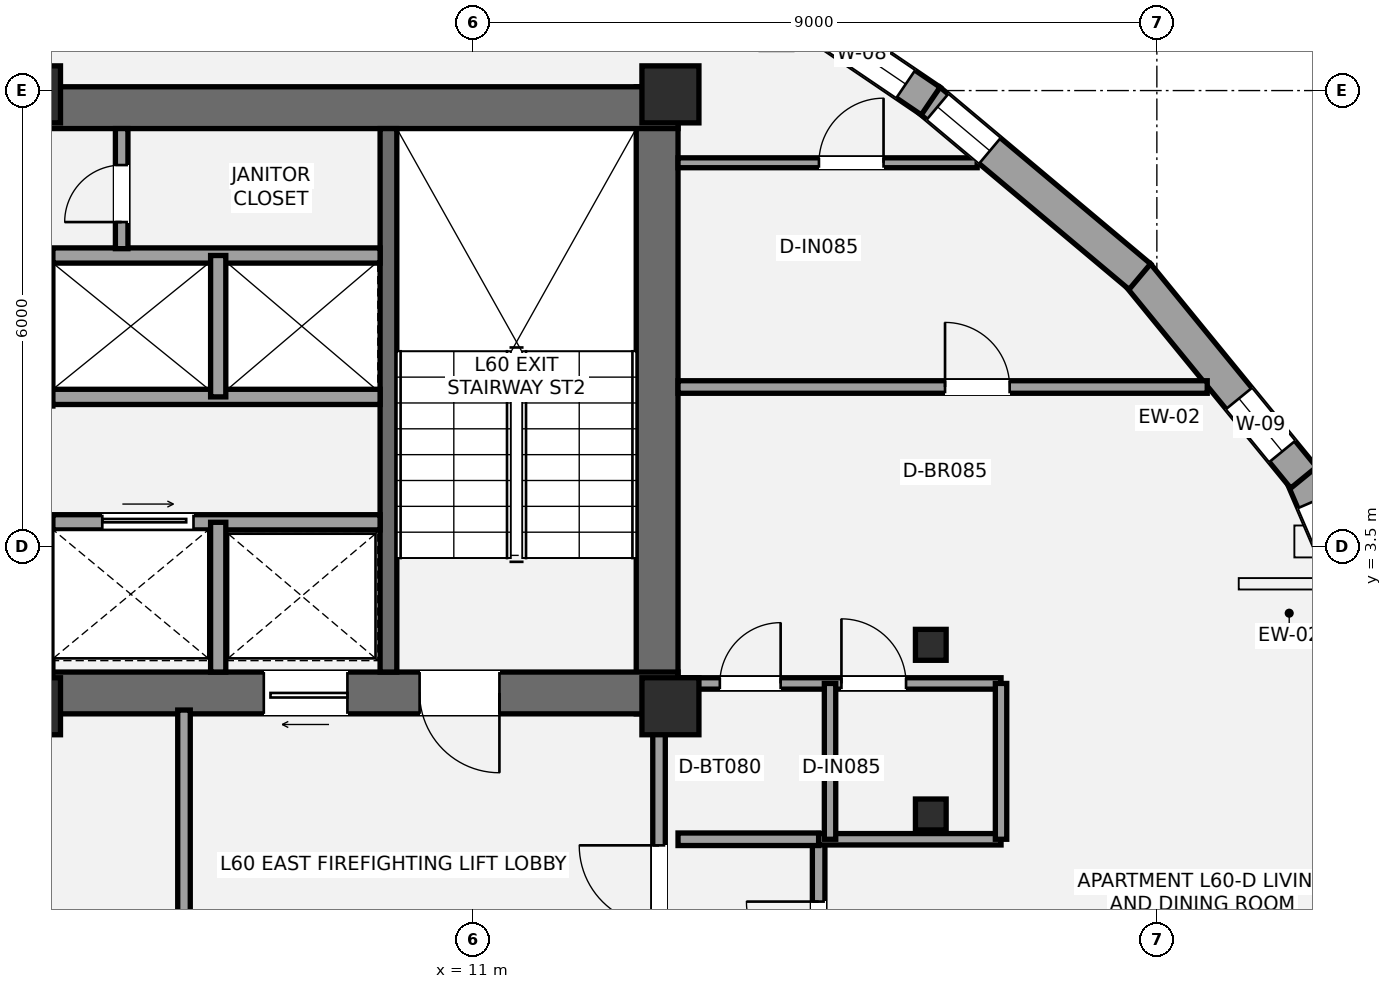
"""IFC4 building model, lengths in metres.
Left out: names, types, materials, properties, quantities, classifications, styles, units other than length and angle.
Written with IfcOpenShell. Run it as: python <this file> out.ifc"""

import sys

from ifc_helpers import new_model, si_unit, direction, frame, frame_2d, origin, origin_2d, place, context, subcontext, project, spatial, rectangle, i_section, extrude, element, fill, save


model = new_model("IFC4")
c1 = context("Model", 3, precision=1e-05, world=origin(), true_north=direction((0.0, 1.0)))
c2 = subcontext(c1, "Body", "Model", "MODEL_VIEW")
j1 = project(units=[si_unit("LENGTHUNIT", "METRE"), si_unit("PLANEANGLEUNIT", "RADIAN")], contexts=[c1])
p1 = place(None, origin())
s1 = spatial("IfcSite", under=j1, at=p1, CompositionType="ELEMENT")
p2 = place(p1, origin())
s2 = spatial("IfcBuilding", under=s1, at=p2, CompositionType="ELEMENT")
p3 = place(p2, frame((0.0, 0.0, 216.3)))
s3 = spatial("IfcBuildingStorey", under=s2, at=p3, CompositionType="ELEMENT", Elevation=216.3)
p4 = place(p3, frame((13.425, 1.3, 0.0), z_axis=(0.0, 0.0, 1.0), x_axis=(0.0, 1.0, 0.0)))
e1 = element("IfcWall", 1, at=p4, inside=s3, PredefinedType="SHEAR", context=c2, shape_type="SweptSolid", body=[
    extrude(rectangle(XDim=8.25, YDim=0.55, at=frame_2d((4.125, 0.0))), origin(), (0.0, 0.0, 1.0), 3.15),
])
p5 = place(p3, frame((4.525, 9.275, 0.0), z_axis=(0.0, 0.0, 1.0), x_axis=(1.0, 0.0, 0.0)))
e2 = element("IfcWall", 2, at=p5, inside=s3, PredefinedType="SHEAR", context=c2, shape_type="SweptSolid", body=[
    extrude(rectangle(XDim=9.175, YDim=0.55, at=frame_2d((4.587, 0.0))), origin(), (0.0, 0.0, 1.0), 3.15),
])
p6 = place(p3, frame((13.7, 1.575, 0.0), z_axis=(0.0, 0.0, 1.0), x_axis=(-1.0, 0.0, 0.0)))
e3 = element("IfcWall", 3, at=p6, inside=s3, PredefinedType="SHEAR", context=c2, shape_type="SweptSolid", body=[
    extrude(rectangle(XDim=8.775, YDim=0.55, at=frame_2d((4.387, 0.0))), origin(), (0.0, 0.0, 1.0), 3.15),
])
p7 = place(p6, frame((2.35, 0.0, 0.0)))
e4 = element("IfcOpeningElement", 4, at=p7, cuts=e3, PredefinedType="OPENING", context=c2, shape_type="SweptSolid", body=[
    extrude(rectangle(XDim=1.05, YDim=2.15, at=frame_2d((0.525, 1.075))), frame((0.0, 0.285, 0.0), z_axis=(0.0, -1.0, 0.0), x_axis=(1.0, 0.0, 0.0)), (0.0, 0.0, 1.0), 0.57),
])
p8 = place(p6, frame((4.35, 0.0, 0.0)))
e5 = element("IfcOpeningElement", 5, at=p8, cuts=e3, PredefinedType="OPENING", context=c2, shape_type="SweptSolid", body=[
    extrude(rectangle(XDim=1.1, YDim=2.2, at=frame_2d((0.55, 1.1))), frame((0.0, 0.285, 0.0), z_axis=(0.0, -1.0, 0.0), x_axis=(1.0, 0.0, 0.0)), (0.0, 0.0, 1.0), 0.57),
])
p9 = place(p3, frame((5.2, 1.3, 0.0), z_axis=(0.0, 0.0, 1.0), x_axis=(0.0, 1.0, 0.0)))
e6 = element("IfcWall", 6, at=p9, inside=s3, PredefinedType="SHEAR", context=c2, shape_type="SweptSolid", body=[
    extrude(rectangle(XDim=2.5, YDim=0.55, at=frame_2d((1.25, 0.0))), origin(), (0.0, 0.0, 1.0), 3.15),
])
p10 = place(p3, frame((5.2, 5.35, 0.0), z_axis=(0.0, 0.0, 1.0), x_axis=(0.0, 1.0, 0.0)))
e7 = element("IfcWall", 7, at=p10, inside=s3, PredefinedType="SHEAR", context=c2, shape_type="SweptSolid", body=[
    extrude(rectangle(XDim=2.0, YDim=0.55, at=frame_2d((1.0, 0.0))), origin(), (0.0, 0.0, 1.0), 3.15),
])
p11 = place(p3, frame((9.89, 1.85, 0.0), z_axis=(0.0, 0.0, 1.0), x_axis=(0.0, 1.0, 0.0)))
e8 = element("IfcWall", 8, at=p11, inside=s3, PredefinedType="SHEAR", context=c2, shape_type="SweptSolid", body=[
    extrude(rectangle(XDim=7.15, YDim=0.22, at=frame_2d((3.575, 0.0))), origin(), (0.0, 0.0, 1.0), 3.15),
])
for number, where, z_axis, x_axis in (
    (9, (5.2, 1.4, 0.0), (0.0, 0.0, 1.0), (1.0, 0.0, 0.0)),
    (10, (5.2, 9.45, 0.0), (0.0, 0.0, 1.0), (1.0, 0.0, 0.0)),
    (11, (13.6, 1.4, 0.0), (0.0, 0.0, 1.0), (1.0, 0.0, 0.0)),
    (12, (13.6, 9.45, 0.0), (0.0, 0.0, 1.0), (1.0, 0.0, 0.0)),
):
    element("IfcColumn", number, at=place(p3, frame(where, z_axis=z_axis, x_axis=x_axis)), inside=s3, PredefinedType="PILASTER", context=c2, shape_type="SweptSolid", body=[
        extrude(rectangle(XDim=0.75, YDim=0.75, at=origin_2d()), origin(), (0.0, 0.0, 1.0), 3.15),
    ])
for number, where, z_axis, x_axis in (
    (13, (17.026, 2.208, 0.0), (0.0, 0.0, 1.0), (1.0, 0.0, 0.0)),
    (14, (17.026, -0.024, 0.0), (0.0, 0.0, 1.0), (1.0, 0.0, 0.0)),
):
    element("IfcColumn", number, at=place(p3, frame(where, z_axis=z_axis, x_axis=x_axis)), inside=s3, PredefinedType="COLUMN", context=c2, shape_type="SweptSolid", body=[
        extrude(i_section(OverallWidth=0.404, OverallDepth=0.407, WebThickness=0.027, FlangeThickness=0.044, at=origin_2d()), origin(), (0.0, 0.0, 1.0), 3.15),
    ])
p12 = place(p3, frame((21.899, 4.46, 0.0), z_axis=(0.0, 0.0, 1.0), x_axis=(0.394735370712, -0.918794855835, 0.0)))
e15 = element("IfcWall", 15, at=p12, inside=s3, PredefinedType="STANDARD", context=c2, shape_type="SweptSolid", body=[
    extrude(rectangle(XDim=3.249, YDim=0.44, at=frame_2d((1.625, 0.0))), origin(), (0.0, 0.0, 1.0), 2.336),
])
p13 = place(p12, frame((0.4, 0.0, 0.55)))
e16 = element("IfcOpeningElement", 16, at=p13, cuts=e15, PredefinedType="OPENING", context=c2, shape_type="SweptSolid", body=[
    extrude(rectangle(XDim=1.4, YDim=1.55, at=frame_2d((0.7, 0.775))), frame((0.0, 0.23, 0.0), z_axis=(0.0, -1.0, 0.0), x_axis=(1.0, 0.0, 0.0)), (0.0, 0.0, 1.0), 0.46),
])
p14 = place(p3, frame((19.747, 7.081, 0.0), z_axis=(0.0, 0.0, 1.0), x_axis=(0.632725461905, -0.774376194015, 0.0)))
e17 = element("IfcWall", 17, at=p14, inside=s3, PredefinedType="STANDARD", context=c2, shape_type="SweptSolid", body=[
    extrude(rectangle(XDim=3.452, YDim=0.44, at=frame_2d((1.726, 0.0))), origin(), (0.0, 0.0, 1.0), 2.336),
])
p15 = place(p14, frame((2.108, 0.0, 0.58)))
e18 = element("IfcOpeningElement", 18, at=p15, cuts=e17, PredefinedType="OPENING", context=c2, shape_type="SweptSolid", body=[
    extrude(rectangle(XDim=0.9, YDim=1.35, at=frame_2d((0.45, 0.675))), frame((0.0, 0.23, 0.0), z_axis=(0.0, -1.0, 0.0), x_axis=(1.0, 0.0, 0.0)), (0.0, 0.0, 1.0), 0.46),
])
p16 = place(p3, frame((17.006, 9.376, 0.0), z_axis=(0.0, 0.0, 1.0), x_axis=(0.766063904081, -0.642764416302, 0.0)))
e19 = element("IfcWall", 19, at=p16, inside=s3, PredefinedType="STANDARD", context=c2, shape_type="SweptSolid", body=[
    extrude(rectangle(XDim=3.615, YDim=0.44, at=frame_2d((1.808, 0.0))), origin(), (0.0, 0.0, 1.0), 2.336),
])
p17 = place(p16, frame((0.14, 0.0, 0.58)))
e20 = element("IfcOpeningElement", 20, at=p17, cuts=e19, PredefinedType="OPENING", context=c2, shape_type="SweptSolid", body=[
    extrude(rectangle(XDim=0.9, YDim=1.35, at=frame_2d((0.45, 0.675))), frame((0.0, 0.23, 0.0), z_axis=(0.0, -1.0, 0.0), x_axis=(1.0, 0.0, 0.0)), (0.0, 0.0, 1.0), 0.46),
])
p18 = place(p3, frame((13.949, 11.448, 0.0), z_axis=(0.0, 0.0, 1.0), x_axis=(0.827595704154, -0.561324639105, 0.0)))
e21 = element("IfcWall", 21, at=p18, inside=s3, PredefinedType="STANDARD", context=c2, shape_type="SweptSolid", body=[
    extrude(rectangle(XDim=3.715, YDim=0.44, at=frame_2d((1.858, 0.0))), origin(), (0.0, 0.0, 1.0), 2.336),
])
p19 = place(p18, frame((1.919, 0.0, 0.58)))
e22 = element("IfcOpeningElement", 22, at=p19, cuts=e21, PredefinedType="OPENING", context=c2, shape_type="SweptSolid", body=[
    extrude(rectangle(XDim=1.4, YDim=1.55, at=frame_2d((0.7, 0.775))), frame((0.0, 0.23, 0.0), z_axis=(0.0, -1.0, 0.0), x_axis=(1.0, 0.0, 0.0)), (0.0, 0.0, 1.0), 0.46),
])
p20 = place(p3, frame((7.2, -2.15, 0.0), z_axis=(0.0, 0.0, 1.0), x_axis=(0.0, 1.0, 0.0)))
e23 = element("IfcWall", 23, at=p20, inside=s3, PredefinedType="PARTITIONING", context=c2, shape_type="SweptSolid", body=[
    extrude(rectangle(XDim=3.5, YDim=0.165, at=frame_2d((1.75, 0.0))), origin(), (0.0, 0.0, 1.0), 2.423),
])
p21 = place(p3, frame((13.45, -2.15, 0.0), z_axis=(0.0, 0.0, 1.0), x_axis=(0.0, 1.0, 0.0)))
e24 = element("IfcWall", 24, at=p21, inside=s3, PredefinedType="PARTITIONING", context=c2, shape_type="SweptSolid", body=[
    extrude(rectangle(XDim=3.5, YDim=0.165, at=frame_2d((1.75, 0.0))), origin(), (0.0, 0.0, 1.0), 2.423),
])
p22 = place(p21, frame((0.67, 0.0, 0.0)))
e25 = element("IfcOpeningElement", 25, at=p22, cuts=e24, PredefinedType="OPENING", context=c2, shape_type="SweptSolid", body=[
    extrude(rectangle(XDim=1.05, YDim=2.15, at=frame_2d((0.525, 1.075))), frame((0.0, 0.093, 0.0), z_axis=(0.0, -1.0, 0.0), x_axis=(1.0, 0.0, 0.0)), (0.0, 0.0, 1.0), 0.185),
])
p23 = place(p3, frame((5.475, 3.82, 0.0), z_axis=(0.0, 0.0, 1.0), x_axis=(1.0, 0.0, 0.0)))
e26 = element("IfcWall", 26, at=p23, inside=s3, PredefinedType="SOLIDWALL", context=c2, shape_type="SweptSolid", body=[
    extrude(rectangle(XDim=4.305, YDim=0.2, at=frame_2d((2.152, 0.0))), origin(), (0.0, 0.0, 1.0), 2.97),
])
p24 = place(p23, frame((0.65, 0.0, 0.0)))
e27 = element("IfcOpeningElement", 27, at=p24, cuts=e26, PredefinedType="OPENING", context=c2, shape_type="SweptSolid", body=[
    extrude(rectangle(XDim=1.2, YDim=2.2, at=frame_2d((0.6, 1.1))), frame((0.0, 0.11, 0.0), z_axis=(0.0, -1.0, 0.0), x_axis=(1.0, 0.0, 0.0)), (0.0, 0.0, 1.0), 0.22),
])
p25 = place(p3, frame((7.65, 1.85, 0.0), z_axis=(0.0, 0.0, 1.0), x_axis=(0.0, 1.0, 0.0)))
e28 = element("IfcWall", 28, at=p25, inside=s3, PredefinedType="SOLIDWALL", context=c2, shape_type="SweptSolid", body=[
    extrude(rectangle(XDim=1.97, YDim=0.2, at=frame_2d((0.985, 0.0))), origin(), (0.0, 0.0, 1.0), 2.97),
])
for number, where, z_axis, x_axis in (
    (29, (5.475, 5.47, 0.0), (0.0, 0.0, 1.0), (1.0, 0.0, 0.0)),
    (30, (5.475, 7.33, 0.0), (0.0, 0.0, 1.0), (1.0, 0.0, 0.0)),
):
    element("IfcWall", number, at=place(p3, frame(where, z_axis=z_axis, x_axis=x_axis)), inside=s3, PredefinedType="SOLIDWALL", context=c2, shape_type="SweptSolid", body=[
        extrude(rectangle(XDim=4.305, YDim=0.2, at=frame_2d((2.152, 0.0))), origin(), (0.0, 0.0, 1.0), 2.97),
    ])
p26 = place(p3, frame((7.65, 5.47, 0.0), z_axis=(0.0, 0.0, 1.0), x_axis=(0.0, 1.0, 0.0)))
e31 = element("IfcWall", 31, at=p26, inside=s3, PredefinedType="SOLIDWALL", context=c2, shape_type="SweptSolid", body=[
    extrude(rectangle(XDim=1.86, YDim=0.2, at=frame_2d((0.93, 0.0))), origin(), (0.0, 0.0, 1.0), 2.97),
])
p27 = place(p3, frame((6.38, 7.42, 0.0), z_axis=(0.0, 0.0, 1.0), x_axis=(0.0, 1.0, 0.0)))
e32 = element("IfcWall", 32, at=p27, inside=s3, PredefinedType="PARTITIONING", context=c2, shape_type="SweptSolid", body=[
    extrude(rectangle(XDim=1.58, YDim=0.165, at=frame_2d((0.79, 0.0))), origin(), (0.0, 0.0, 1.0), 2.97),
])
p28 = place(p27, frame((0.35, 0.0, 0.0)))
e33 = element("IfcOpeningElement", 33, at=p28, cuts=e32, PredefinedType="OPENING", context=c2, shape_type="SweptSolid", body=[
    extrude(rectangle(XDim=0.75, YDim=2.1, at=frame_2d((0.375, 1.05))), frame((0.0, 0.093, 0.0), z_axis=(0.0, -1.0, 0.0), x_axis=(1.0, 0.0, 0.0)), (0.0, 0.0, 1.0), 0.185),
])
p29 = place(p3, frame((15.55, -3.95, 0.0), z_axis=(0.0, 0.0, 1.0), x_axis=(0.0, 1.0, 0.0)))
e34 = element("IfcWall", 34, at=p29, inside=s3, PredefinedType="PARTITIONING", context=c2, shape_type="SweptSolid", body=[
    extrude(rectangle(XDim=3.6, YDim=0.165, at=frame_2d((1.8, 0.0))), origin(), (0.0, 0.0, 1.0), 2.357),
])
p30 = place(p29, frame((1.83, 0.0, 0.0)))
e35 = element("IfcOpeningElement", 35, at=p30, cuts=e34, PredefinedType="OPENING", context=c2, shape_type="SweptSolid", body=[
    extrude(rectangle(XDim=0.95, YDim=2.15, at=frame_2d((0.475, 1.075))), frame((0.0, 0.093, 0.0), z_axis=(0.0, -1.0, 0.0), x_axis=(1.0, 0.0, 0.0)), (0.0, 0.0, 1.0), 0.185),
])
p31 = place(p3, frame((13.7, -0.35, 0.0), z_axis=(0.0, 0.0, 1.0), x_axis=(1.0, 0.0, 0.0)))
e36 = element("IfcWall", 36, at=p31, inside=s3, PredefinedType="PARTITIONING", context=c2, shape_type="SweptSolid", body=[
    extrude(rectangle(XDim=1.85, YDim=0.165, at=frame_2d((0.925, 0.0))), origin(), (0.0, 0.0, 1.0), 2.423),
])
p32 = place(p3, frame((13.7, 5.6, 0.0), z_axis=(0.0, 0.0, 1.0), x_axis=(1.0, 0.0, 0.0)))
e37 = element("IfcWall", 37, at=p32, inside=s3, PredefinedType="PARTITIONING", context=c2, shape_type="SweptSolid", body=[
    extrude(rectangle(XDim=6.963, YDim=0.165, at=frame_2d((3.481, 0.0))), origin(), (0.0, 0.0, 1.0), 2.97),
])
p33 = place(p32, frame((3.513, 0.0, 0.0)))
e38 = element("IfcOpeningElement", 38, at=p33, cuts=e37, PredefinedType="OPENING", context=c2, shape_type="SweptSolid", body=[
    extrude(rectangle(XDim=0.85, YDim=2.1, at=frame_2d((0.425, 1.05))), frame((0.0, 0.093, 0.0), z_axis=(0.0, -1.0, 0.0), x_axis=(1.0, 0.0, 0.0)), (0.0, 0.0, 1.0), 0.185),
])
p34 = place(p3, frame((13.7, 1.7, 0.0), z_axis=(0.0, 0.0, 1.0), x_axis=(1.0, 0.0, 0.0)))
e39 = element("IfcWall", 39, at=p34, inside=s3, PredefinedType="PLUMBINGWALL", context=c2, shape_type="SweptSolid", body=[
    extrude(rectangle(XDim=4.25, YDim=0.15, at=frame_2d((2.125, 0.0))), origin(), (0.0, 0.0, 1.0), 2.423),
])
p35 = place(p34, frame((0.55, 0.0, 0.0)))
e40 = element("IfcOpeningElement", 40, at=p35, cuts=e39, PredefinedType="OPENING", context=c2, shape_type="SweptSolid", body=[
    extrude(rectangle(XDim=0.8, YDim=2.1, at=frame_2d((0.4, 1.05))), frame((0.0, 0.085, 0.0), z_axis=(0.0, -1.0, 0.0), x_axis=(1.0, 0.0, 0.0)), (0.0, 0.0, 1.0), 0.17),
])
p36 = place(p34, frame((2.15, 0.0, 0.0)))
e41 = element("IfcOpeningElement", 41, at=p36, cuts=e39, PredefinedType="OPENING", context=c2, shape_type="SweptSolid", body=[
    extrude(rectangle(XDim=0.85, YDim=2.1, at=frame_2d((0.425, 1.05))), frame((0.0, 0.085, 0.0), z_axis=(0.0, -1.0, 0.0), x_axis=(1.0, 0.0, 0.0)), (0.0, 0.0, 1.0), 0.17),
])
p37 = place(p3, frame((15.55, -0.35, 0.0), z_axis=(0.0, 0.0, 1.0), x_axis=(1.0, 0.0, 0.0)))
e42 = element("IfcWall", 42, at=p37, inside=s3, PredefinedType="PLUMBINGWALL", context=c2, shape_type="SweptSolid", body=[
    extrude(rectangle(XDim=2.4, YDim=0.15, at=frame_2d((1.2, 0.0))), origin(), (0.0, 0.0, 1.0), 2.423),
])
p38 = place(p3, frame((15.7, -0.35, 0.0), z_axis=(0.0, 0.0, 1.0), x_axis=(0.0, 1.0, 0.0)))
e43 = element("IfcWall", 43, at=p38, inside=s3, PredefinedType="PLUMBINGWALL", context=c2, shape_type="SweptSolid", body=[
    extrude(rectangle(XDim=2.05, YDim=0.15, at=frame_2d((1.025, 0.0))), origin(), (0.0, 0.0, 1.0), 2.97),
])
p39 = place(p3, frame((17.95, -0.35, 0.0), z_axis=(0.0, 0.0, 1.0), x_axis=(0.0, 1.0, 0.0)))
e44 = element("IfcWall", 44, at=p39, inside=s3, PredefinedType="PLUMBINGWALL", context=c2, shape_type="SweptSolid", body=[
    extrude(rectangle(XDim=2.05, YDim=0.15, at=frame_2d((1.025, 0.0))), origin(), (0.0, 0.0, 1.0), 2.423),
])
p40 = place(p3, frame((13.7, 8.55, 0.0), z_axis=(0.0, 0.0, 1.0), x_axis=(1.0, 0.0, 0.0)))
e45 = element("IfcWall", 45, at=p40, inside=s3, PredefinedType="PARTITIONING", context=c2, shape_type="SweptSolid", body=[
    extrude(rectangle(XDim=3.936, YDim=0.13, at=frame_2d((1.968, 0.0))), origin(), (0.0, 0.0, 1.0), 2.423),
])
p41 = place(p40, frame((1.854, 0.0, 0.0)))
e46 = element("IfcOpeningElement", 46, at=p41, cuts=e45, PredefinedType="OPENING", context=c2, shape_type="SweptSolid", body=[
    extrude(rectangle(XDim=0.85, YDim=2.1, at=frame_2d((0.425, 1.05))), frame((0.0, 0.075, 0.0), z_axis=(0.0, -1.0, 0.0), x_axis=(1.0, 0.0, 0.0)), (0.0, 0.0, 1.0), 0.15),
])
p42 = place(p13, origin())
e47 = element("IfcWindow", 47, at=p42, inside=s3, PartitioningType="SINGLE_PANEL", PredefinedType="WINDOW", context=c2, shape_type="SweptSolid", body=[
    extrude(rectangle(XDim=1.4, YDim=1.55, at=frame_2d((0.7, 0.775))), frame((0.0, -0.01, 0.0), z_axis=(0.0, -1.0, 0.0), x_axis=(1.0, 0.0, 0.0)), (0.0, 0.0, 1.0), 0.06),
])
fill(e16, e47)
p43 = place(p15, origin())
e48 = element("IfcWindow", 48, at=p43, inside=s3, PartitioningType="SINGLE_PANEL", PredefinedType="WINDOW", context=c2, shape_type="SweptSolid", body=[
    extrude(rectangle(XDim=0.9, YDim=1.35, at=frame_2d((0.45, 0.675))), frame((0.0, -0.01, 0.0), z_axis=(0.0, -1.0, 0.0), x_axis=(1.0, 0.0, 0.0)), (0.0, 0.0, 1.0), 0.06),
])
fill(e18, e48)
p44 = place(p19, origin())
e49 = element("IfcWindow", 49, at=p44, inside=s3, PartitioningType="SINGLE_PANEL", PredefinedType="WINDOW", context=c2, shape_type="SweptSolid", body=[
    extrude(rectangle(XDim=1.4, YDim=1.55, at=frame_2d((0.7, 0.775))), frame((0.0, -0.01, 0.0), z_axis=(0.0, -1.0, 0.0), x_axis=(1.0, 0.0, 0.0)), (0.0, 0.0, 1.0), 0.06),
])
fill(e22, e49)
p45 = place(p17, origin())
e50 = element("IfcWindow", 50, at=p45, inside=s3, PartitioningType="SINGLE_PANEL", PredefinedType="WINDOW", context=c2, shape_type="SweptSolid", body=[
    extrude(rectangle(XDim=0.9, YDim=1.35, at=frame_2d((0.45, 0.675))), frame((0.0, -0.01, 0.0), z_axis=(0.0, -1.0, 0.0), x_axis=(1.0, 0.0, 0.0)), (0.0, 0.0, 1.0), 0.06),
])
fill(e20, e50)
p46 = place(p7, origin())
e51 = element("IfcDoor", 51, at=p46, inside=s3, OperationType="SINGLE_SWING_LEFT", PredefinedType="DOOR", context=c2, shape_type="SweptSolid", body=[
    extrude(rectangle(XDim=1.05, YDim=2.15, at=frame_2d((0.525, 1.075))), frame((0.0, 0.025, 0.0), z_axis=(0.0, -1.0, 0.0), x_axis=(1.0, 0.0, 0.0)), (0.0, 0.0, 1.0), 0.05),
])
fill(e4, e51)
p47 = place(p22, origin())
e52 = element("IfcDoor", 52, at=p47, inside=s3, OperationType="SINGLE_SWING_RIGHT", PredefinedType="DOOR", context=c2, shape_type="SweptSolid", body=[
    extrude(rectangle(XDim=1.05, YDim=2.15, at=frame_2d((0.525, 1.075))), frame((0.0, 0.025, 0.0), z_axis=(0.0, -1.0, 0.0), x_axis=(1.0, 0.0, 0.0)), (0.0, 0.0, 1.0), 0.05),
])
fill(e25, e52)
p48 = place(p8, origin())
e53 = element("IfcDoor", 53, at=p48, inside=s3, OperationType="SLIDING_TO_LEFT", PredefinedType="DOOR", context=c2, shape_type="SweptSolid", body=[
    extrude(rectangle(XDim=1.1, YDim=2.2, at=frame_2d((0.55, 1.1))), frame((0.0, 0.025, 0.0), z_axis=(0.0, -1.0, 0.0), x_axis=(1.0, 0.0, 0.0)), (0.0, 0.0, 1.0), 0.05),
])
fill(e5, e53)
p49 = place(p24, origin())
e54 = element("IfcDoor", 54, at=p49, inside=s3, OperationType="SLIDING_TO_RIGHT", PredefinedType="DOOR", context=c2, shape_type="SweptSolid", body=[
    extrude(rectangle(XDim=1.2, YDim=2.2, at=frame_2d((0.6, 1.1))), frame((0.0, 0.025, 0.0), z_axis=(0.0, -1.0, 0.0), x_axis=(1.0, 0.0, 0.0)), (0.0, 0.0, 1.0), 0.05),
])
fill(e27, e54)
p50 = place(p28, origin())
e55 = element("IfcDoor", 55, at=p50, inside=s3, OperationType="SINGLE_SWING_LEFT", PredefinedType="DOOR", context=c2, shape_type="SweptSolid", body=[
    extrude(rectangle(XDim=0.75, YDim=2.1, at=frame_2d((0.375, 1.05))), frame((0.0, 0.025, 0.0), z_axis=(0.0, -1.0, 0.0), x_axis=(1.0, 0.0, 0.0)), (0.0, 0.0, 1.0), 0.05),
])
fill(e33, e55)
p51 = place(p30, origin())
e56 = element("IfcDoor", 56, at=p51, inside=s3, OperationType="SINGLE_SWING_RIGHT", PredefinedType="DOOR", context=c2, shape_type="SweptSolid", body=[
    extrude(rectangle(XDim=0.95, YDim=2.15, at=frame_2d((0.475, 1.075))), frame((0.0, 0.025, 0.0), z_axis=(0.0, -1.0, 0.0), x_axis=(1.0, 0.0, 0.0)), (0.0, 0.0, 1.0), 0.05),
])
fill(e35, e56)
p52 = place(p35, origin())
e57 = element("IfcDoor", 57, at=p52, inside=s3, OperationType="SINGLE_SWING_RIGHT", PredefinedType="DOOR", context=c2, shape_type="SweptSolid", body=[
    extrude(rectangle(XDim=0.8, YDim=2.1, at=frame_2d((0.4, 1.05))), frame((0.0, 0.025, 0.0), z_axis=(0.0, -1.0, 0.0), x_axis=(1.0, 0.0, 0.0)), (0.0, 0.0, 1.0), 0.05),
])
fill(e40, e57)
p53 = place(p36, origin())
e58 = element("IfcDoor", 58, at=p53, inside=s3, OperationType="SINGLE_SWING_LEFT", PredefinedType="DOOR", context=c2, shape_type="SweptSolid", body=[
    extrude(rectangle(XDim=0.85, YDim=2.1, at=frame_2d((0.425, 1.05))), frame((0.0, 0.025, 0.0), z_axis=(0.0, -1.0, 0.0), x_axis=(1.0, 0.0, 0.0)), (0.0, 0.0, 1.0), 0.05),
])
fill(e41, e58)
p54 = place(p33, origin())
e59 = element("IfcDoor", 59, at=p54, inside=s3, OperationType="SINGLE_SWING_LEFT", PredefinedType="DOOR", context=c2, shape_type="SweptSolid", body=[
    extrude(rectangle(XDim=0.85, YDim=2.1, at=frame_2d((0.425, 1.05))), frame((0.0, 0.025, 0.0), z_axis=(0.0, -1.0, 0.0), x_axis=(1.0, 0.0, 0.0)), (0.0, 0.0, 1.0), 0.05),
])
fill(e38, e59)
p55 = place(p41, origin())
e60 = element("IfcDoor", 60, at=p55, inside=s3, OperationType="SINGLE_SWING_RIGHT", PredefinedType="DOOR", context=c2, shape_type="SweptSolid", body=[
    extrude(rectangle(XDim=0.85, YDim=2.1, at=frame_2d((0.425, 1.05))), frame((0.0, 0.025, 0.0), z_axis=(0.0, -1.0, 0.0), x_axis=(1.0, 0.0, 0.0)), (0.0, 0.0, 1.0), 0.05),
])
fill(e46, e60)
save(model, sys.argv[1])
